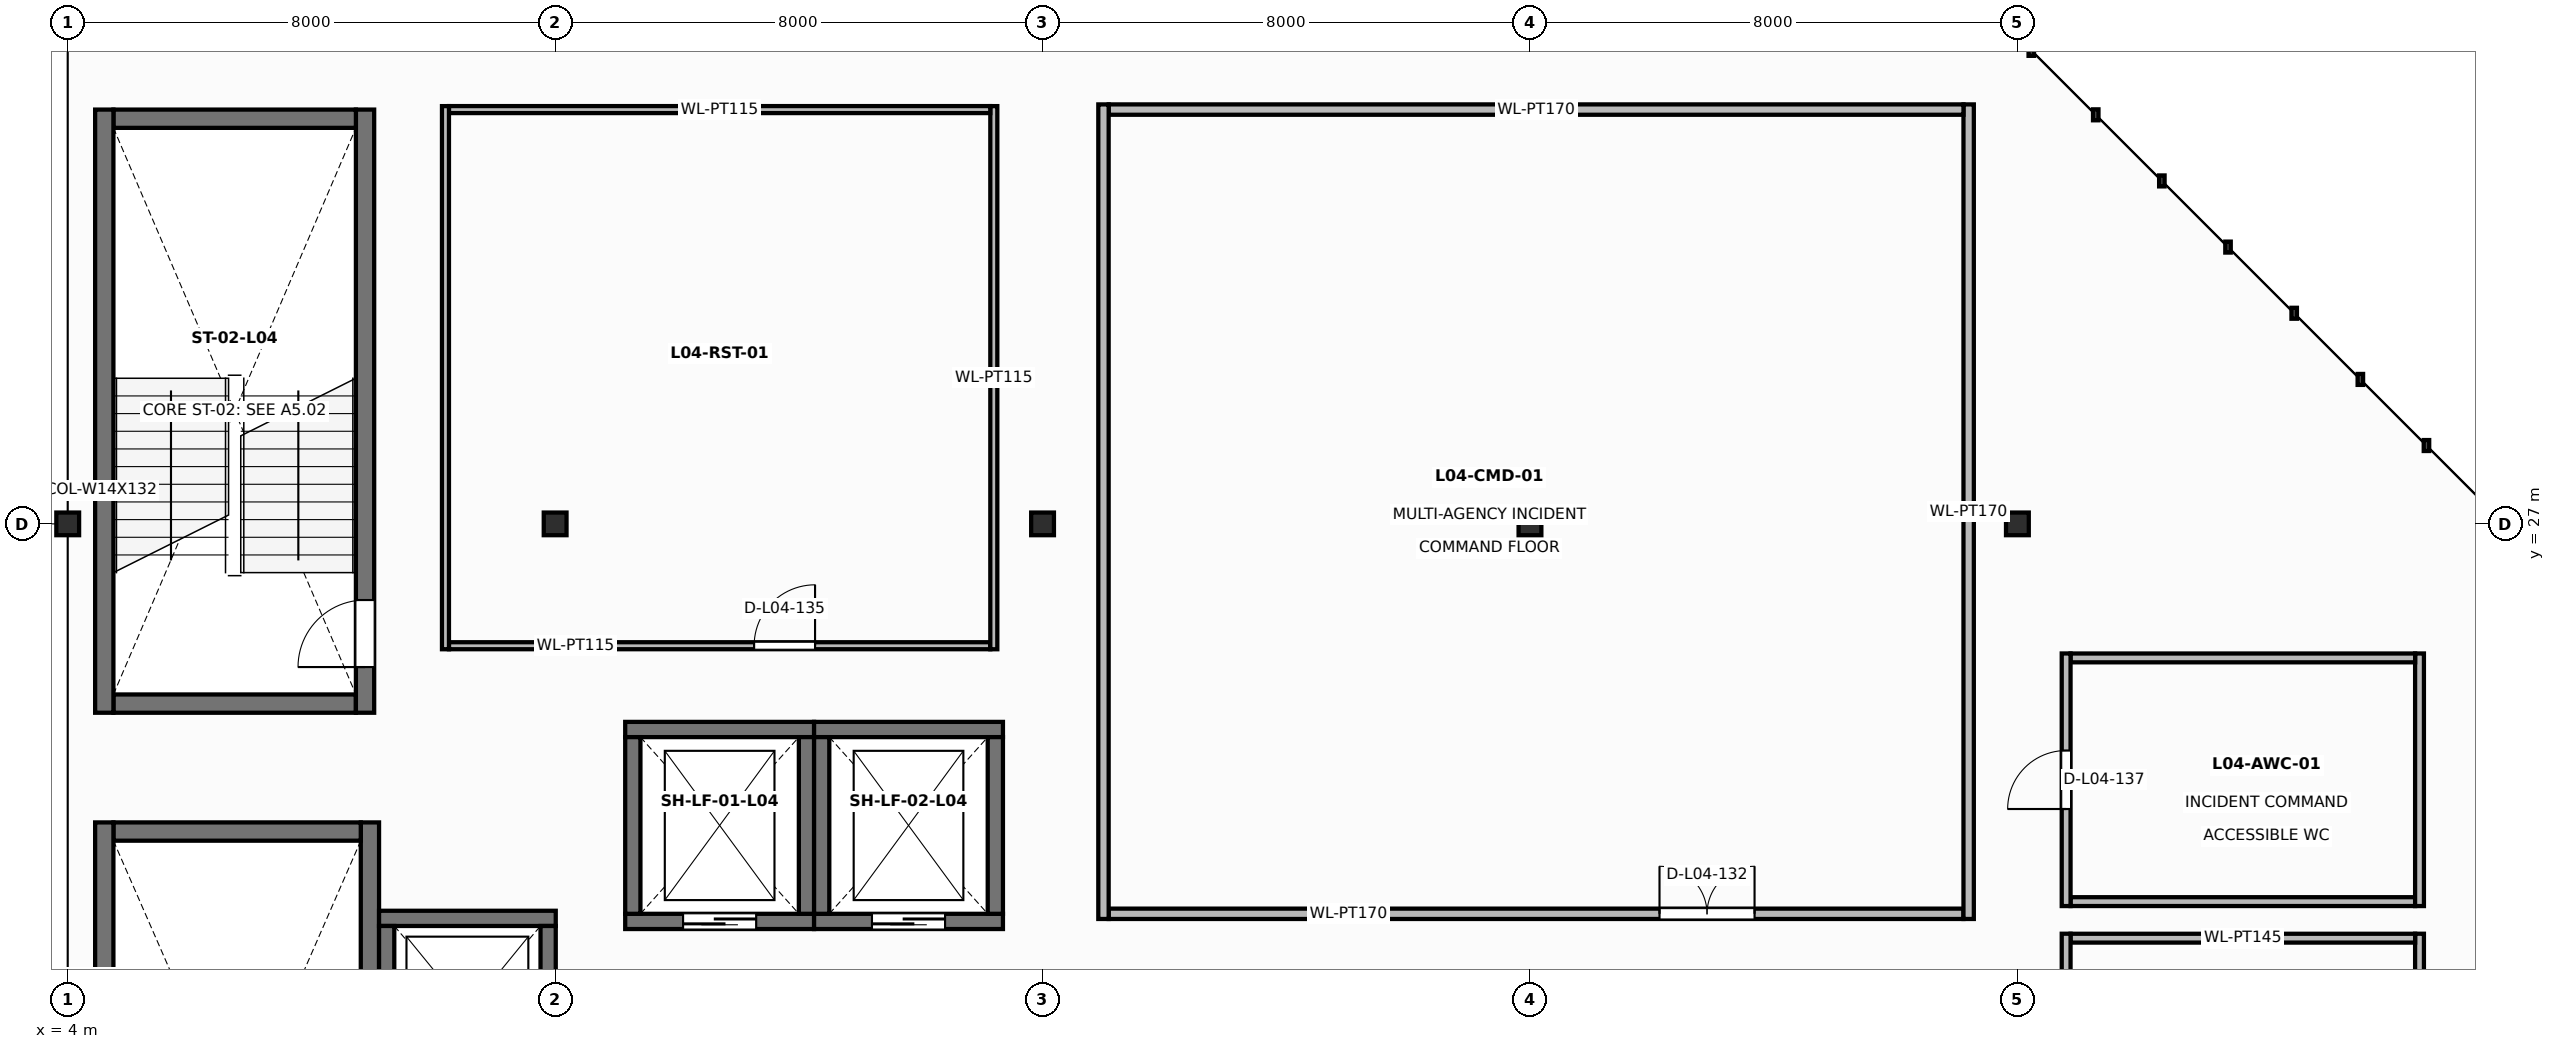
"""IFC4 building model, lengths in metres.
Left out: names, types, materials, properties, quantities, classifications, styles, units other than length and angle.
Written with IfcOpenShell. Run it as: python <this file> out.ifc"""

import sys

from ifc_helpers import new_model, si_unit, direction, frame, frame_2d, origin, origin_2d, place, context, subcontext, project, spatial, rectangle, i_section, extrude, element, fill, save


model = new_model("IFC4")
c1 = context("Model", 3, precision=1e-05, world=origin(), true_north=direction((0.0, 1.0)))
c2 = subcontext(c1, "Body", "Model", "MODEL_VIEW")
j1 = project(units=[si_unit("LENGTHUNIT", "METRE"), si_unit("PLANEANGLEUNIT", "RADIAN")], contexts=[c1])
p1 = place(None, origin())
s1 = spatial("IfcSite", under=j1, at=p1, CompositionType="ELEMENT")
p2 = place(p1, origin())
s2 = spatial("IfcBuilding", under=s1, at=p2, CompositionType="ELEMENT")
p3 = place(p2, frame((0.0, 0.0, 19.8)))
s3 = spatial("IfcBuildingStorey", under=s2, at=p3, CompositionType="ELEMENT", Elevation=19.8)
for number, where, z_axis, x_axis in (
    (1, (4.0, 27.0, 0.0), (0.0, 0.0, 1.0), (1.0, 0.0, 0.0)),
    (2, (12.0, 27.0, 0.0), (0.0, 0.0, 1.0), (1.0, 0.0, 0.0)),
    (3, (20.0, 27.0, 0.0), (0.0, 0.0, 1.0), (1.0, 0.0, 0.0)),
    (4, (28.0, 27.0, 0.0), (0.0, 0.0, 1.0), (1.0, 0.0, 0.0)),
    (5, (36.0, 27.0, 0.0), (0.0, 0.0, 1.0), (1.0, 0.0, 0.0)),
):
    element("IfcColumn", number, at=place(p3, frame(where, z_axis=z_axis, x_axis=x_axis)), inside=s3, PredefinedType="COLUMN", context=c2, shape_type="SweptSolid", body=[
        extrude(i_section(OverallWidth=0.374, OverallDepth=0.372, WebThickness=0.016, FlangeThickness=0.026, at=origin_2d()), origin(), (0.0, 0.0, 1.0), 4.2),
    ])
p4 = place(p3, frame((8.96, 12.2, 0.0), z_axis=(0.0, 0.0, 1.0), x_axis=(0.0, 1.0, 0.0)))
e6 = element("IfcWall", 6, at=p4, inside=s3, PredefinedType="SHEAR", context=c2, shape_type="SweptSolid", body=[
    extrude(rectangle(XDim=9.9, YDim=0.3, at=frame_2d((4.95, 0.0))), origin(), (0.0, 0.0, 1.0), 3.98),
])
p5 = place(p4, frame((0.75, 0.0, 0.0)))
e7 = element("IfcOpeningElement", 7, at=p5, cuts=e6, PredefinedType="OPENING", context=c2, shape_type="SweptSolid", body=[
    extrude(rectangle(XDim=1.1, YDim=2.15, at=frame_2d((0.55, 1.075))), frame((0.0, 0.16, 0.0), z_axis=(0.0, -1.0, 0.0), x_axis=(1.0, 0.0, 0.0)), (0.0, 0.0, 1.0), 0.32),
])
p6 = place(p3, frame((8.81, 21.95, 0.0), z_axis=(0.0, 0.0, 1.0), x_axis=(-1.0, 0.0, 0.0)))
e8 = element("IfcWall", 8, at=p6, inside=s3, PredefinedType="SHEAR", context=c2, shape_type="SweptSolid", body=[
    extrude(rectangle(XDim=4.06, YDim=0.3, at=frame_2d((2.03, 0.0))), origin(), (0.0, 0.0, 1.0), 3.98),
])
p7 = place(p3, frame((4.6, 22.1, 0.0), z_axis=(0.0, 0.0, 1.0), x_axis=(0.0, -1.0, 0.0)))
e9 = element("IfcWall", 9, at=p7, inside=s3, PredefinedType="SHEAR", context=c2, shape_type="SweptSolid", body=[
    extrude(rectangle(XDim=9.9, YDim=0.3, at=frame_2d((4.95, 0.0))), origin(), (0.0, 0.0, 1.0), 3.98),
])
p8 = place(p3, frame((4.75, 24.05, 0.0), z_axis=(0.0, 0.0, 1.0), x_axis=(1.0, 0.0, 0.0)))
e10 = element("IfcWall", 10, at=p8, inside=s3, PredefinedType="SHEAR", context=c2, shape_type="SweptSolid", body=[
    extrude(rectangle(XDim=3.98, YDim=0.3, at=frame_2d((1.99, 0.0))), origin(), (0.0, 0.0, 1.0), 3.98),
])
p9 = place(p3, frame((8.88, 23.9, 0.0), z_axis=(0.0, 0.0, 1.0), x_axis=(0.0, 1.0, 0.0)))
e11 = element("IfcWall", 11, at=p9, inside=s3, PredefinedType="SHEAR", context=c2, shape_type="SweptSolid", body=[
    extrude(rectangle(XDim=9.9, YDim=0.3, at=frame_2d((4.95, 0.0))), origin(), (0.0, 0.0, 1.0), 3.98),
])
p10 = place(p9, frame((0.75, 0.0, 0.0)))
e12 = element("IfcOpeningElement", 12, at=p10, cuts=e11, PredefinedType="OPENING", context=c2, shape_type="SweptSolid", body=[
    extrude(rectangle(XDim=1.1, YDim=2.15, at=frame_2d((0.55, 1.075))), frame((0.0, 0.16, 0.0), z_axis=(0.0, -1.0, 0.0), x_axis=(1.0, 0.0, 0.0)), (0.0, 0.0, 1.0), 0.32),
])
p11 = place(p3, frame((8.73, 33.65, 0.0), z_axis=(0.0, 0.0, 1.0), x_axis=(-1.0, 0.0, 0.0)))
e13 = element("IfcWall", 13, at=p11, inside=s3, PredefinedType="SHEAR", context=c2, shape_type="SweptSolid", body=[
    extrude(rectangle(XDim=3.98, YDim=0.3, at=frame_2d((1.99, 0.0))), origin(), (0.0, 0.0, 1.0), 3.98),
])
p12 = place(p3, frame((4.6, 33.8, 0.0), z_axis=(0.0, 0.0, 1.0), x_axis=(0.0, -1.0, 0.0)))
e14 = element("IfcWall", 14, at=p12, inside=s3, PredefinedType="SHEAR", context=c2, shape_type="SweptSolid", body=[
    extrude(rectangle(XDim=9.9, YDim=0.3, at=frame_2d((4.95, 0.0))), origin(), (0.0, 0.0, 1.0), 3.98),
])
p13 = place(p3, frame((12.01, 20.525, 0.0), z_axis=(0.0, 0.0, 1.0), x_axis=(-1.0, 0.0, 0.0)))
e15 = element("IfcWall", 15, at=p13, inside=s3, PredefinedType="SOLIDWALL", context=c2, shape_type="SweptSolid", body=[
    extrude(rectangle(XDim=2.9, YDim=0.25, at=frame_2d((1.45, 0.0))), origin(), (0.0, 0.0, 1.0), 3.98),
])
for number, where, z_axis, x_axis in (
    (16, (11.885, 17.6, 0.0), (0.0, 0.0, 1.0), (0.0, 1.0, 0.0)),
    (17, (9.235, 20.4, 0.0), (0.0, 0.0, 1.0), (0.0, -1.0, 0.0)),
):
    element("IfcWall", number, at=place(p3, frame(where, z_axis=z_axis, x_axis=x_axis)), inside=s3, PredefinedType="SOLIDWALL", context=c2, shape_type="SweptSolid", body=[
        extrude(rectangle(XDim=2.8, YDim=0.25, at=frame_2d((1.4, 0.0))), origin(), (0.0, 0.0, 1.0), 3.98),
    ])
p14 = place(p3, frame((13.15, 20.475, 0.0), z_axis=(0.0, 0.0, 1.0), x_axis=(1.0, 0.0, 0.0)))
e18 = element("IfcWall", 18, at=p14, inside=s3, PredefinedType="SOLIDWALL", context=c2, shape_type="SweptSolid", body=[
    extrude(rectangle(XDim=3.1, YDim=0.25, at=frame_2d((1.55, 0.0))), origin(), (0.0, 0.0, 1.0), 3.98),
])
p15 = place(p14, frame((0.95, 0.0, 0.0)))
e19 = element("IfcOpeningElement", 19, at=p15, cuts=e18, PredefinedType="OPENING", context=c2, shape_type="SweptSolid", body=[
    extrude(rectangle(XDim=1.2, YDim=2.2, at=frame_2d((0.6, 1.1))), frame((0.0, 0.135, 0.0), z_axis=(0.0, -1.0, 0.0), x_axis=(1.0, 0.0, 0.0)), (0.0, 0.0, 1.0), 0.27),
])
p16 = place(p3, frame((16.25, 23.625, 0.0), z_axis=(0.0, 0.0, 1.0), x_axis=(-1.0, 0.0, 0.0)))
e20 = element("IfcWall", 20, at=p16, inside=s3, PredefinedType="SOLIDWALL", context=c2, shape_type="SweptSolid", body=[
    extrude(rectangle(XDim=3.1, YDim=0.25, at=frame_2d((1.55, 0.0))), origin(), (0.0, 0.0, 1.0), 3.98),
])
for number, where, z_axis, x_axis in (
    (21, (16.125, 20.6, 0.0), (0.0, 0.0, 1.0), (0.0, 1.0, 0.0)),
    (22, (13.275, 23.5, 0.0), (0.0, 0.0, 1.0), (0.0, -1.0, 0.0)),
):
    element("IfcWall", number, at=place(p3, frame(where, z_axis=z_axis, x_axis=x_axis)), inside=s3, PredefinedType="SOLIDWALL", context=c2, shape_type="SweptSolid", body=[
        extrude(rectangle(XDim=2.9, YDim=0.25, at=frame_2d((1.45, 0.0))), origin(), (0.0, 0.0, 1.0), 3.98),
    ])
p17 = place(p3, frame((16.25, 20.475, 0.0), z_axis=(0.0, 0.0, 1.0), x_axis=(1.0, 0.0, 0.0)))
e23 = element("IfcWall", 23, at=p17, inside=s3, PredefinedType="SOLIDWALL", context=c2, shape_type="SweptSolid", body=[
    extrude(rectangle(XDim=3.1, YDim=0.25, at=frame_2d((1.55, 0.0))), origin(), (0.0, 0.0, 1.0), 3.98),
])
p18 = place(p17, frame((0.95, 0.0, 0.0)))
e24 = element("IfcOpeningElement", 24, at=p18, cuts=e23, PredefinedType="OPENING", context=c2, shape_type="SweptSolid", body=[
    extrude(rectangle(XDim=1.2, YDim=2.2, at=frame_2d((0.6, 1.1))), frame((0.0, 0.135, 0.0), z_axis=(0.0, -1.0, 0.0), x_axis=(1.0, 0.0, 0.0)), (0.0, 0.0, 1.0), 0.27),
])
p19 = place(p3, frame((19.35, 23.625, 0.0), z_axis=(0.0, 0.0, 1.0), x_axis=(-1.0, 0.0, 0.0)))
e25 = element("IfcWall", 25, at=p19, inside=s3, PredefinedType="SOLIDWALL", context=c2, shape_type="SweptSolid", body=[
    extrude(rectangle(XDim=3.1, YDim=0.25, at=frame_2d((1.55, 0.0))), origin(), (0.0, 0.0, 1.0), 3.98),
])
for number, where, z_axis, x_axis in (
    (26, (19.225, 20.6, 0.0), (0.0, 0.0, 1.0), (0.0, 1.0, 0.0)),
    (27, (16.375, 23.5, 0.0), (0.0, 0.0, 1.0), (0.0, -1.0, 0.0)),
):
    element("IfcWall", number, at=place(p3, frame(where, z_axis=z_axis, x_axis=x_axis)), inside=s3, PredefinedType="SOLIDWALL", context=c2, shape_type="SweptSolid", body=[
        extrude(rectangle(XDim=2.9, YDim=0.25, at=frame_2d((1.45, 0.0))), origin(), (0.0, 0.0, 1.0), 3.98),
    ])
p20 = place(p3, frame((21.085, 20.6, 0.0), z_axis=(0.0, 0.0, 1.0), x_axis=(1.0, 0.0, 0.0)))
e28 = element("IfcWall", 28, at=p20, inside=s3, PredefinedType="PARTITIONING", context=c2, shape_type="SweptSolid", body=[
    extrude(rectangle(XDim=14.03, YDim=0.17, at=frame_2d((7.015, 0.0))), origin(), (0.0, 0.0, 1.0), 3.364),
])
p21 = place(p20, frame((9.041, 0.0, 0.0)))
e29 = element("IfcOpeningElement", 29, at=p21, cuts=e28, PredefinedType="OPENING", context=c2, shape_type="SweptSolid", body=[
    extrude(rectangle(XDim=1.56, YDim=2.22, at=frame_2d((0.78, 1.11))), frame((0.0, 0.095, 0.0), z_axis=(0.0, -1.0, 0.0), x_axis=(1.0, 0.0, 0.0)), (0.0, 0.0, 1.0), 0.19),
])
p22 = place(p3, frame((35.2, 20.515, 0.0), z_axis=(0.0, 0.0, 1.0), x_axis=(0.0, 1.0, 0.0)))
e30 = element("IfcWall", 30, at=p22, inside=s3, PredefinedType="PARTITIONING", context=c2, shape_type="SweptSolid", body=[
    extrude(rectangle(XDim=13.37, YDim=0.17, at=frame_2d((6.685, 0.0))), origin(), (0.0, 0.0, 1.0), 3.2),
])
p23 = place(p3, frame((35.115, 33.8, 0.0), z_axis=(0.0, 0.0, 1.0), x_axis=(-1.0, 0.0, 0.0)))
e31 = element("IfcWall", 31, at=p23, inside=s3, PredefinedType="PARTITIONING", context=c2, shape_type="SweptSolid", body=[
    extrude(rectangle(XDim=14.03, YDim=0.17, at=frame_2d((7.015, 0.0))), origin(), (0.0, 0.0, 1.0), 3.364),
])
p24 = place(p3, frame((21.0, 33.885, 0.0), z_axis=(0.0, 0.0, 1.0), x_axis=(0.0, -1.0, 0.0)))
e32 = element("IfcWall", 32, at=p24, inside=s3, PredefinedType="PARTITIONING", context=c2, shape_type="SweptSolid", body=[
    extrude(rectangle(XDim=13.37, YDim=0.17, at=frame_2d((6.685, 0.0))), origin(), (0.0, 0.0, 1.0), 3.2),
])
p25 = place(p3, frame((10.257, 25.0, 0.0), z_axis=(0.0, 0.0, 1.0), x_axis=(1.0, 0.0, 0.0)))
e33 = element("IfcWall", 33, at=p25, inside=s3, PredefinedType="PARTITIONING", context=c2, shape_type="SweptSolid", body=[
    extrude(rectangle(XDim=8.885, YDim=0.115, at=frame_2d((4.442, 0.0))), origin(), (0.0, 0.0, 1.0), 3.98),
])
p26 = place(p25, frame((5.009, 0.0, 0.0)))
e34 = element("IfcOpeningElement", 34, at=p26, cuts=e33, PredefinedType="OPENING", context=c2, shape_type="SweptSolid", body=[
    extrude(rectangle(XDim=1.0, YDim=2.15, at=frame_2d((0.5, 1.075))), frame((0.0, 0.067, 0.0), z_axis=(0.0, -1.0, 0.0), x_axis=(1.0, 0.0, 0.0)), (0.0, 0.0, 1.0), 0.135),
])
p27 = place(p3, frame((19.2, 24.942, 0.0), z_axis=(0.0, 0.0, 1.0), x_axis=(0.0, 1.0, 0.0)))
e35 = element("IfcWall", 35, at=p27, inside=s3, PredefinedType="PARTITIONING", context=c2, shape_type="SweptSolid", body=[
    extrude(rectangle(XDim=8.915, YDim=0.115, at=frame_2d((4.458, 0.0))), origin(), (0.0, 0.0, 1.0), 3.2),
])
p28 = place(p3, frame((19.142, 33.8, 0.0), z_axis=(0.0, 0.0, 1.0), x_axis=(-1.0, 0.0, 0.0)))
e36 = element("IfcWall", 36, at=p28, inside=s3, PredefinedType="PARTITIONING", context=c2, shape_type="SweptSolid", body=[
    extrude(rectangle(XDim=8.885, YDim=0.115, at=frame_2d((4.442, 0.0))), origin(), (0.0, 0.0, 1.0), 3.98),
])
p29 = place(p3, frame((10.2, 33.857, 0.0), z_axis=(0.0, 0.0, 1.0), x_axis=(0.0, -1.0, 0.0)))
e37 = element("IfcWall", 37, at=p29, inside=s3, PredefinedType="PARTITIONING", context=c2, shape_type="SweptSolid", body=[
    extrude(rectangle(XDim=8.915, YDim=0.115, at=frame_2d((4.458, 0.0))), origin(), (0.0, 0.0, 1.0), 3.98),
])
p30 = place(p3, frame((42.6, 14.527, 0.0), z_axis=(0.0, 0.0, 1.0), x_axis=(0.0, 1.0, 0.0)))
e38 = element("IfcWall", 38, at=p30, inside=s3, PredefinedType="PARTITIONING", context=c2, shape_type="SweptSolid", body=[
    extrude(rectangle(XDim=5.746, YDim=0.145, at=frame_2d((2.873, 0.0))), origin(), (0.0, 0.0, 1.0), 3.98),
])
p31 = place(p3, frame((42.528, 20.2, 0.0), z_axis=(0.0, 0.0, 1.0), x_axis=(-1.0, 0.0, 0.0)))
e39 = element("IfcWall", 39, at=p31, inside=s3, PredefinedType="PARTITIONING", context=c2, shape_type="SweptSolid", body=[
    extrude(rectangle(XDim=5.656, YDim=0.145, at=frame_2d((2.828, 0.0))), origin(), (0.0, 0.0, 1.0), 3.98),
])
p32 = place(p3, frame((36.8, 20.273, 0.0), z_axis=(0.0, 0.0, 1.0), x_axis=(0.0, -1.0, 0.0)))
e40 = element("IfcWall", 40, at=p32, inside=s3, PredefinedType="PARTITIONING", context=c2, shape_type="SweptSolid", body=[
    extrude(rectangle(XDim=5.746, YDim=0.145, at=frame_2d((2.873, 0.0))), origin(), (0.0, 0.0, 1.0), 3.98),
])
p33 = place(p32, frame((3.562, 0.0, 0.0)))
e41 = element("IfcOpeningElement", 41, at=p33, cuts=e40, PredefinedType="OPENING", context=c2, shape_type="SweptSolid", body=[
    extrude(rectangle(XDim=0.92, YDim=2.1, at=frame_2d((0.46, 1.05))), frame((0.0, 0.083, 0.0), z_axis=(0.0, -1.0, 0.0), x_axis=(1.0, 0.0, 0.0)), (0.0, 0.0, 1.0), 0.165),
])
p34 = place(p3, frame((36.872, 20.8, 0.0), z_axis=(0.0, 0.0, 1.0), x_axis=(1.0, 0.0, 0.0)))
e42 = element("IfcWall", 42, at=p34, inside=s3, PredefinedType="PARTITIONING", context=c2, shape_type="SweptSolid", body=[
    extrude(rectangle(XDim=5.656, YDim=0.145, at=frame_2d((2.828, 0.0))), origin(), (0.0, 0.0, 1.0), 3.98),
])
p35 = place(p3, frame((42.6, 20.727, 0.0), z_axis=(0.0, 0.0, 1.0), x_axis=(0.0, 1.0, 0.0)))
e43 = element("IfcWall", 43, at=p35, inside=s3, PredefinedType="PARTITIONING", context=c2, shape_type="SweptSolid", body=[
    extrude(rectangle(XDim=4.146, YDim=0.145, at=frame_2d((2.073, 0.0))), origin(), (0.0, 0.0, 1.0), 3.98),
])
p36 = place(p3, frame((42.528, 24.8, 0.0), z_axis=(0.0, 0.0, 1.0), x_axis=(-1.0, 0.0, 0.0)))
e44 = element("IfcWall", 44, at=p36, inside=s3, PredefinedType="PARTITIONING", context=c2, shape_type="SweptSolid", body=[
    extrude(rectangle(XDim=5.656, YDim=0.145, at=frame_2d((2.828, 0.0))), origin(), (0.0, 0.0, 1.0), 3.98),
])
p37 = place(p3, frame((36.8, 24.873, 0.0), z_axis=(0.0, 0.0, 1.0), x_axis=(0.0, -1.0, 0.0)))
e45 = element("IfcWall", 45, at=p37, inside=s3, PredefinedType="PARTITIONING", context=c2, shape_type="SweptSolid", body=[
    extrude(rectangle(XDim=4.146, YDim=0.145, at=frame_2d((2.073, 0.0))), origin(), (0.0, 0.0, 1.0), 3.98),
])
p38 = place(p37, frame((1.593, 0.0, 0.0)))
e46 = element("IfcOpeningElement", 46, at=p38, cuts=e45, PredefinedType="OPENING", context=c2, shape_type="SweptSolid", body=[
    extrude(rectangle(XDim=0.96, YDim=2.12, at=frame_2d((0.48, 1.06))), frame((0.0, 0.083, 0.0), z_axis=(0.0, -1.0, 0.0), x_axis=(1.0, 0.0, 0.0)), (0.0, 0.0, 1.0), 0.165),
])
p39 = place(p10, origin())
e47 = element("IfcDoor", 47, at=p39, inside=s3, OperationType="SINGLE_SWING_LEFT", PredefinedType="DOOR", context=c2, shape_type="SweptSolid", body=[
    extrude(rectangle(XDim=1.1, YDim=2.15, at=frame_2d((0.55, 1.075))), frame((0.0, 0.025, 0.0), z_axis=(0.0, -1.0, 0.0), x_axis=(1.0, 0.0, 0.0)), (0.0, 0.0, 1.0), 0.05),
])
fill(e12, e47)
p40 = place(p15, frame((1.2, 0.0, 0.0), z_axis=(0.0, 0.0, 1.0), x_axis=(-1.0, 0.0, 0.0)))
e48 = element("IfcDoor", 48, at=p40, inside=s3, OperationType="DOUBLE_DOOR_SLIDING", PredefinedType="DOOR", context=c2, shape_type="SweptSolid", body=[
    extrude(rectangle(XDim=1.2, YDim=2.2, at=frame_2d((0.6, 1.1))), frame((0.0, 0.025, 0.0), z_axis=(0.0, -1.0, 0.0), x_axis=(1.0, 0.0, 0.0)), (0.0, 0.0, 1.0), 0.05),
])
fill(e19, e48)
p41 = place(p18, frame((1.2, 0.0, 0.0), z_axis=(0.0, 0.0, 1.0), x_axis=(-1.0, 0.0, 0.0)))
e49 = element("IfcDoor", 49, at=p41, inside=s3, OperationType="DOUBLE_DOOR_SLIDING", PredefinedType="DOOR", context=c2, shape_type="SweptSolid", body=[
    extrude(rectangle(XDim=1.2, YDim=2.2, at=frame_2d((0.6, 1.1))), frame((0.0, 0.025, 0.0), z_axis=(0.0, -1.0, 0.0), x_axis=(1.0, 0.0, 0.0)), (0.0, 0.0, 1.0), 0.05),
])
fill(e24, e49)
p42 = place(p21, origin())
e50 = element("IfcDoor", 50, at=p42, inside=s3, OperationType="DOUBLE_DOOR_SINGLE_SWING", PredefinedType="DOOR", context=c2, shape_type="SweptSolid", body=[
    extrude(rectangle(XDim=1.56, YDim=2.22, at=frame_2d((0.78, 1.11))), frame((0.0, 0.025, 0.0), z_axis=(0.0, -1.0, 0.0), x_axis=(1.0, 0.0, 0.0)), (0.0, 0.0, 1.0), 0.05),
])
fill(e29, e50)
p43 = place(p26, origin())
e51 = element("IfcDoor", 51, at=p43, inside=s3, OperationType="SINGLE_SWING_RIGHT", PredefinedType="DOOR", context=c2, shape_type="SweptSolid", body=[
    extrude(rectangle(XDim=1.0, YDim=2.15, at=frame_2d((0.5, 1.075))), frame((0.0, 0.025, 0.0), z_axis=(0.0, -1.0, 0.0), x_axis=(1.0, 0.0, 0.0)), (0.0, 0.0, 1.0), 0.05),
])
fill(e34, e51)
p44 = place(p38, frame((0.96, 0.0, 0.0), z_axis=(0.0, 0.0, 1.0), x_axis=(-1.0, 0.0, 0.0)))
e52 = element("IfcDoor", 52, at=p44, inside=s3, OperationType="SINGLE_SWING_RIGHT", PredefinedType="DOOR", context=c2, shape_type="SweptSolid", body=[
    extrude(rectangle(XDim=0.96, YDim=2.12, at=frame_2d((0.48, 1.06))), frame((0.0, 0.025, 0.0), z_axis=(0.0, -1.0, 0.0), x_axis=(1.0, 0.0, 0.0)), (0.0, 0.0, 1.0), 0.05),
])
fill(e46, e52)
save(model, sys.argv[1])
